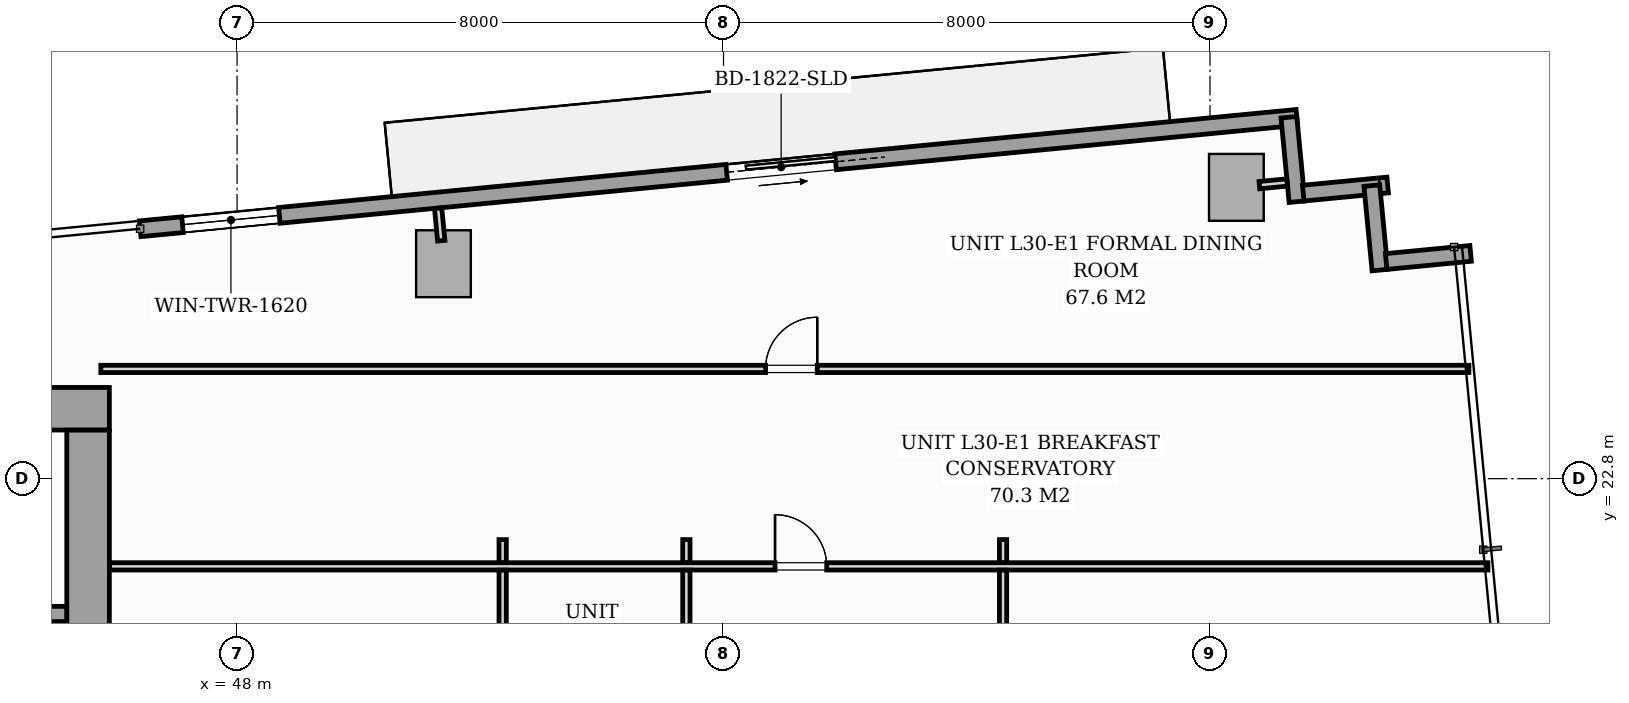
"""IFC4 building model, lengths in metres.
Left out: names, types, materials, properties, quantities, classifications, styles, units other than length and angle.
Written with IfcOpenShell. Run it as: python <this file> out.ifc"""

import sys

from ifc_helpers import new_model, si_unit, direction, frame, frame_2d, origin, origin_2d, place, context, subcontext, project, spatial, rectangle, i_section, extrude, source, transform, mapped, element, fill, save


model = new_model("IFC4")
c1 = context("Model", 3, precision=1e-05, world=origin(), true_north=direction((0.0, 1.0)))
c2 = subcontext(c1, "Body", "Model", "MODEL_VIEW")
j1 = project(units=[si_unit("LENGTHUNIT", "METRE"), si_unit("PLANEANGLEUNIT", "RADIAN")], contexts=[c1])
p1 = place(None, origin())
s1 = spatial("IfcSite", under=j1, at=p1, CompositionType="ELEMENT")
p2 = place(p1, origin())
s2 = spatial("IfcBuilding", under=s1, at=p2, CompositionType="ELEMENT")
p3 = place(p2, frame((0.0, 0.0, 106.6)))
s3 = spatial("IfcBuildingStorey", under=s2, at=p3, CompositionType="ELEMENT", Elevation=106.6)
m1 = source(origin(), c2, "Body", "SweptSolid", [
    extrude(i_section(OverallWidth=0.427, OverallDepth=0.483, WebThickness=0.051, FlangeThickness=0.082, FilletRadius=0.018, at=origin_2d()), origin(), (0.0, 0.0, 1.0), 3.196),
])
p4 = place(p3, frame((45.6, 24.0, 0.002), z_axis=(0.0, 0.0, 1.0), x_axis=(1.0, 0.0, 0.0)))
e1 = element("IfcColumn", 1, at=p4, inside=s3, PredefinedType="PILASTER", context=c2, shape_type="MappedRepresentation", body=[
    mapped(m1, transform((0.0, 0.0, 0.0), scale=1.0)),
])
m2 = source(origin(), c2, "Body", "SweptSolid", [
    extrude(rectangle(XDim=0.9, YDim=1.1, at=origin_2d()), origin(), (0.0, 0.0, 1.0), 3.196),
])
for number, where, z_axis, x_axis in (
    (2, (51.394, 26.335, 0.002), (0.0, 0.0, 1.0), (0.995, 0.096, 0.0)),
    (3, (64.434, 27.591, 0.002), (0.0, 0.0, 1.0), (0.995, 0.096, 0.0)),
):
    element("IfcColumn", number, at=place(p3, frame(where, z_axis=z_axis, x_axis=x_axis)), inside=s3, PredefinedType="COLUMN", context=c2, shape_type="MappedRepresentation", body=[
        mapped(m2, transform((0.0, 0.0, 0.0), scale=1.0)),
    ])
p5 = place(p3, frame((46.406, 26.91, 0.0), z_axis=(0.0, 0.0, 1.0), x_axis=(0.995396638587, 0.095841180552, 0.0)))
e4 = element("IfcWall", 4, at=p5, inside=s3, PredefinedType="STANDARD", context=c2, shape_type="SweptSolid", body=[
    extrude(rectangle(XDim=19.11, YDim=0.26, at=frame_2d((9.555, 0.0))), origin(), (0.0, 0.0, 1.0), 2.94),
])
p6 = place(p5, frame((9.69, 0.0, 0.0)))
e5 = element("IfcOpeningElement", 5, at=p6, cuts=e4, PredefinedType="OPENING", context=c2, shape_type="SweptSolid", body=[
    extrude(rectangle(XDim=1.8, YDim=2.06, at=frame_2d((0.9, 1.03))), frame((0.0, 0.14, 0.0), z_axis=(0.0, -1.0, 0.0), x_axis=(1.0, 0.0, 0.0)), (0.0, 0.0, 1.0), 0.28),
])
p7 = place(p5, frame((0.7, 0.0, 0.65)))
e6 = element("IfcOpeningElement", 6, at=p7, cuts=e4, PredefinedType="OPENING", context=c2, shape_type="SweptSolid", body=[
    extrude(rectangle(XDim=1.6, YDim=1.5, at=frame_2d((0.8, 0.75))), frame((0.0, 0.14, 0.0), z_axis=(0.0, -1.0, 0.0), x_axis=(1.0, 0.0, 0.0)), (0.0, 0.0, 1.0), 0.28),
])
for number, where, z_axis, x_axis in (
    (7, (65.298, 28.744, 0.0), (0.0, 0.0, 1.0), (0.096, -0.995, 0.0)),
    (8, (65.533, 27.496, 0.0), (0.0, 0.0, 1.0), (0.995, 0.096, 0.0)),
):
    element("IfcWall", number, at=place(p3, frame(where, z_axis=z_axis, x_axis=x_axis)), inside=s3, PredefinedType="STANDARD", context=c2, shape_type="SweptSolid", body=[
        extrude(rectangle(XDim=1.395, YDim=0.26, at=frame_2d((0.698, 0.0))), origin(), (0.0, 0.0, 1.0), 2.94),
    ])
p8 = place(p3, frame((66.662, 27.619, 0.0), z_axis=(0.0, 0.0, 1.0), x_axis=(0.095742423056, -0.99540614245, 0.0)))
e9 = element("IfcWall", 9, at=p8, inside=s3, PredefinedType="STANDARD", context=c2, shape_type="SweptSolid", body=[
    extrude(rectangle(XDim=1.395, YDim=0.26, at=frame_2d((0.697, 0.0))), origin(), (0.0, 0.0, 1.0), 2.94),
])
p9 = place(p3, frame((66.897, 26.371, 0.0), z_axis=(0.0, 0.0, 1.0), x_axis=(0.995391056452, 0.09589913835, 0.0)))
e10 = element("IfcWall", 10, at=p9, inside=s3, PredefinedType="STANDARD", context=c2, shape_type="SweptSolid", body=[
    extrude(rectangle(XDim=1.395, YDim=0.26, at=frame_2d((0.698, 0.0))), origin(), (0.0, 0.0, 1.0), 2.94),
])
p10 = place(p3, frame((26.1, 23.95, 0.0), z_axis=(0.0, 0.0, 1.0), x_axis=(1.0, 0.0, 0.0)))
e11 = element("IfcWall", 11, at=p10, inside=s3, PredefinedType="SHEAR", context=c2, shape_type="SweptSolid", body=[
    extrude(rectangle(XDim=19.8, YDim=0.7, at=frame_2d((9.9, 0.0))), origin(), (0.0, 0.0, 1.0), 3.2),
])
p11 = place(p3, frame((45.55, 17.802, 0.0), z_axis=(0.0, 0.0, 1.0), x_axis=(0.0, 1.0, 0.0)))
e12 = element("IfcWall", 12, at=p11, inside=s3, PredefinedType="SHEAR", context=c2, shape_type="SweptSolid", body=[
    extrude(rectangle(XDim=5.796, YDim=0.7, at=frame_2d((2.898, 0.0))), origin(), (0.0, 0.0, 1.0), 3.2),
])
p12 = place(p3, frame((37.05, 20.575, 0.0), z_axis=(0.0, 0.0, 1.0), x_axis=(1.0, 0.0, 0.0)))
e13 = element("IfcWall", 13, at=p12, inside=s3, PredefinedType="SOLIDWALL", context=c2, shape_type="SweptSolid", body=[
    extrude(rectangle(XDim=8.148, YDim=0.25, at=frame_2d((4.074, 0.0))), origin(), (0.0, 0.0, 1.0), 3.2),
])
p13 = place(p12, frame((6.6, 0.0, 0.0)))
e14 = element("IfcOpeningElement", 14, at=p13, cuts=e13, PredefinedType="OPENING", context=c2, shape_type="SweptSolid", body=[
    extrude(rectangle(XDim=0.95, YDim=2.06, at=frame_2d((0.475, 1.03))), frame((0.0, 0.135, 0.0), z_axis=(0.0, -1.0, 0.0), x_axis=(1.0, 0.0, 0.0)), (0.0, 0.0, 1.0), 0.27),
])
p14 = place(p3, frame((45.76, 24.605, 0.0), z_axis=(0.0, 0.0, 1.0), x_axis=(1.0, 0.0, 0.0)))
e15 = element("IfcWall", 15, at=p14, inside=s3, PredefinedType="PARTITIONING", context=c2, shape_type="SweptSolid", body=[
    extrude(rectangle(XDim=22.498, YDim=0.12, at=frame_2d((11.249, 0.0))), origin(), (0.0, 0.0, 1.0), 2.94),
])
p15 = place(p14, frame((10.931, 0.0, 0.0)))
e16 = element("IfcOpeningElement", 16, at=p15, cuts=e15, PredefinedType="OPENING", context=c2, shape_type="SweptSolid", body=[
    extrude(rectangle(XDim=0.85, YDim=2.05, at=frame_2d((0.425, 1.025))), frame((0.0, 0.07, 0.0), z_axis=(0.0, -1.0, 0.0), x_axis=(1.0, 0.0, 0.0)), (0.0, 0.0, 1.0), 0.14),
])
p16 = place(p3, frame((45.902, 21.358, 0.0), z_axis=(0.0, 0.0, 1.0), x_axis=(1.0, 0.0, 0.0)))
e17 = element("IfcWall", 17, at=p16, inside=s3, PredefinedType="PARTITIONING", context=c2, shape_type="SweptSolid", body=[
    extrude(rectangle(XDim=22.668, YDim=0.12, at=frame_2d((11.334, 0.0))), origin(), (0.0, 0.0, 1.0), 2.94),
])
p17 = place(p16, frame((10.945, 0.0, 0.0)))
e18 = element("IfcOpeningElement", 18, at=p17, cuts=e17, PredefinedType="OPENING", context=c2, shape_type="SweptSolid", body=[
    extrude(rectangle(XDim=0.85, YDim=2.05, at=frame_2d((0.425, 1.025))), frame((0.0, 0.07, 0.0), z_axis=(0.0, -1.0, 0.0), x_axis=(1.0, 0.0, 0.0)), (0.0, 0.0, 1.0), 0.14),
])
p18 = place(p3, frame((60.597, 10.209, 0.0), z_axis=(0.0, 0.0, 1.0), x_axis=(0.0, 1.0, 0.0)))
e19 = element("IfcWall", 19, at=p18, inside=s3, PredefinedType="PARTITIONING", context=c2, shape_type="SweptSolid", body=[
    extrude(rectangle(XDim=11.087, YDim=0.12, at=frame_2d((5.543, 0.0))), origin(), (0.0, 0.0, 1.0), 2.94),
])
p19 = place(p18, frame((5.118, 0.0, 0.0)))
e20 = element("IfcOpeningElement", 20, at=p19, cuts=e19, PredefinedType="OPENING", context=c2, shape_type="SweptSolid", body=[
    extrude(rectangle(XDim=0.85, YDim=2.05, at=frame_2d((0.425, 1.025))), frame((0.0, 0.07, 0.0), z_axis=(0.0, -1.0, 0.0), x_axis=(1.0, 0.0, 0.0)), (0.0, 0.0, 1.0), 0.14),
])
p20 = place(p3, frame((60.597, 21.42, 0.0), z_axis=(0.0, 0.0, 1.0), x_axis=(0.0, 1.0, 0.0)))
e21 = element("IfcWall", 21, at=p20, inside=s3, PredefinedType="PARTITIONING", context=c2, shape_type="SweptSolid", body=[
    extrude(rectangle(XDim=0.378, YDim=0.12, at=frame_2d((0.189, 0.0))), origin(), (0.0, 0.0, 1.0), 2.94),
])
p21 = place(p3, frame((55.389, 10.209, 0.0), z_axis=(0.0, 0.0, 1.0), x_axis=(0.0, 1.0, 0.0)))
e22 = element("IfcWall", 22, at=p21, inside=s3, PredefinedType="PARTITIONING", context=c2, shape_type="SweptSolid", body=[
    extrude(rectangle(XDim=11.087, YDim=0.12, at=frame_2d((5.543, 0.0))), origin(), (0.0, 0.0, 1.0), 2.94),
])
p22 = place(p21, frame((5.118, 0.0, 0.0)))
e23 = element("IfcOpeningElement", 23, at=p22, cuts=e22, PredefinedType="OPENING", context=c2, shape_type="SweptSolid", body=[
    extrude(rectangle(XDim=0.85, YDim=2.05, at=frame_2d((0.425, 1.025))), frame((0.0, 0.07, 0.0), z_axis=(0.0, -1.0, 0.0), x_axis=(1.0, 0.0, 0.0)), (0.0, 0.0, 1.0), 0.14),
])
p23 = place(p3, frame((55.389, 21.42, 0.0), z_axis=(0.0, 0.0, 1.0), x_axis=(0.0, 1.0, 0.0)))
e24 = element("IfcWall", 24, at=p23, inside=s3, PredefinedType="PARTITIONING", context=c2, shape_type="SweptSolid", body=[
    extrude(rectangle(XDim=0.378, YDim=0.12, at=frame_2d((0.189, 0.0))), origin(), (0.0, 0.0, 1.0), 2.94),
])
p24 = place(p3, frame((52.368, 10.209, 0.0), z_axis=(0.0, 0.0, 1.0), x_axis=(0.0, 1.0, 0.0)))
e25 = element("IfcWall", 25, at=p24, inside=s3, PredefinedType="PARTITIONING", context=c2, shape_type="SweptSolid", body=[
    extrude(rectangle(XDim=11.087, YDim=0.12, at=frame_2d((5.543, 0.0))), origin(), (0.0, 0.0, 1.0), 2.94),
])
p25 = place(p24, frame((5.118, 0.0, 0.0)))
e26 = element("IfcOpeningElement", 26, at=p25, cuts=e25, PredefinedType="OPENING", context=c2, shape_type="SweptSolid", body=[
    extrude(rectangle(XDim=0.85, YDim=2.05, at=frame_2d((0.425, 1.025))), frame((0.0, 0.07, 0.0), z_axis=(0.0, -1.0, 0.0), x_axis=(1.0, 0.0, 0.0)), (0.0, 0.0, 1.0), 0.14),
])
p26 = place(p3, frame((52.368, 21.42, 0.0), z_axis=(0.0, 0.0, 1.0), x_axis=(0.0, 1.0, 0.0)))
e27 = element("IfcWall", 27, at=p26, inside=s3, PredefinedType="PARTITIONING", context=c2, shape_type="SweptSolid", body=[
    extrude(rectangle(XDim=0.378, YDim=0.12, at=frame_2d((0.189, 0.0))), origin(), (0.0, 0.0, 1.0), 2.94),
])
p27 = place(p3, frame((51.358, 26.713, 0.0), z_axis=(0.0, 0.0, 1.0), x_axis=(-0.095772948675, 0.995403205893, 0.0)))
e28 = element("IfcWall", 28, at=p27, inside=s3, PredefinedType="PARTITIONING", context=c2, shape_type="SweptSolid", body=[
    extrude(rectangle(XDim=0.538, YDim=0.12, at=frame_2d((0.269, 0.0))), origin(), (0.0, 0.0, 1.0), 2.94),
])
p28 = place(p3, frame((64.812, 27.627, 0.0), z_axis=(0.0, 0.0, 1.0), x_axis=(0.995389482415, 0.095915474751, 0.0)))
e29 = element("IfcWall", 29, at=p28, inside=s3, PredefinedType="PARTITIONING", context=c2, shape_type="SweptSolid", body=[
    extrude(rectangle(XDim=0.458, YDim=0.12, at=frame_2d((0.229, 0.0))), origin(), (0.0, 0.0, 1.0), 2.94),
])
m3 = source(origin(), c2, "Body", "SweptSolid", [
    extrude(rectangle(XDim=1.8, YDim=2.06, at=frame_2d((0.9, 1.03))), frame((0.0, 0.025, 0.0), z_axis=(0.0, -1.0, 0.0), x_axis=(1.0, 0.0, 0.0)), (0.0, 0.0, 1.0), 0.05),
])
p29 = place(p6, origin())
e30 = element("IfcDoor", 30, at=p29, inside=s3, OperationType="SLIDING_TO_RIGHT", PredefinedType="DOOR", context=c2, shape_type="MappedRepresentation", body=[
    mapped(m3, transform((0.0, 0.0, 0.0), scale=1.0)),
])
fill(e5, e30)
m4 = source(origin(), c2, "Body", "SweptSolid", [
    extrude(rectangle(XDim=1.6, YDim=1.5, at=frame_2d((0.8, 0.75))), frame((0.0, 0.03, 0.0), z_axis=(0.0, -1.0, 0.0), x_axis=(1.0, 0.0, 0.0)), (0.0, 0.0, 1.0), 0.06),
])
p30 = place(p7, origin())
e31 = element("IfcWindow", 31, at=p30, inside=s3, PartitioningType="SINGLE_PANEL", PredefinedType="WINDOW", context=c2, shape_type="MappedRepresentation", body=[
    mapped(m4, transform((0.0, 0.0, 0.0), scale=1.0)),
])
fill(e6, e31)
m5 = source(origin(), c2, "Body", "SweptSolid", [
    extrude(rectangle(XDim=0.85, YDim=2.05, at=frame_2d((0.425, 1.025))), frame((0.0, 0.025, 0.0), z_axis=(0.0, -1.0, 0.0), x_axis=(1.0, 0.0, 0.0)), (0.0, 0.0, 1.0), 0.05),
])
p31 = place(p15, origin())
e32 = element("IfcDoor", 32, at=p31, inside=s3, OperationType="SINGLE_SWING_RIGHT", PredefinedType="DOOR", context=c2, shape_type="MappedRepresentation", body=[
    mapped(m5, transform((0.0, 0.0, 0.0), scale=1.0)),
])
fill(e16, e32)
p32 = place(p17, origin())
e33 = element("IfcDoor", 33, at=p32, inside=s3, OperationType="SINGLE_SWING_LEFT", PredefinedType="DOOR", context=c2, shape_type="MappedRepresentation", body=[
    mapped(m5, transform((0.0, 0.0, 0.0), scale=1.0)),
])
fill(e18, e33)
save(model, sys.argv[1])
